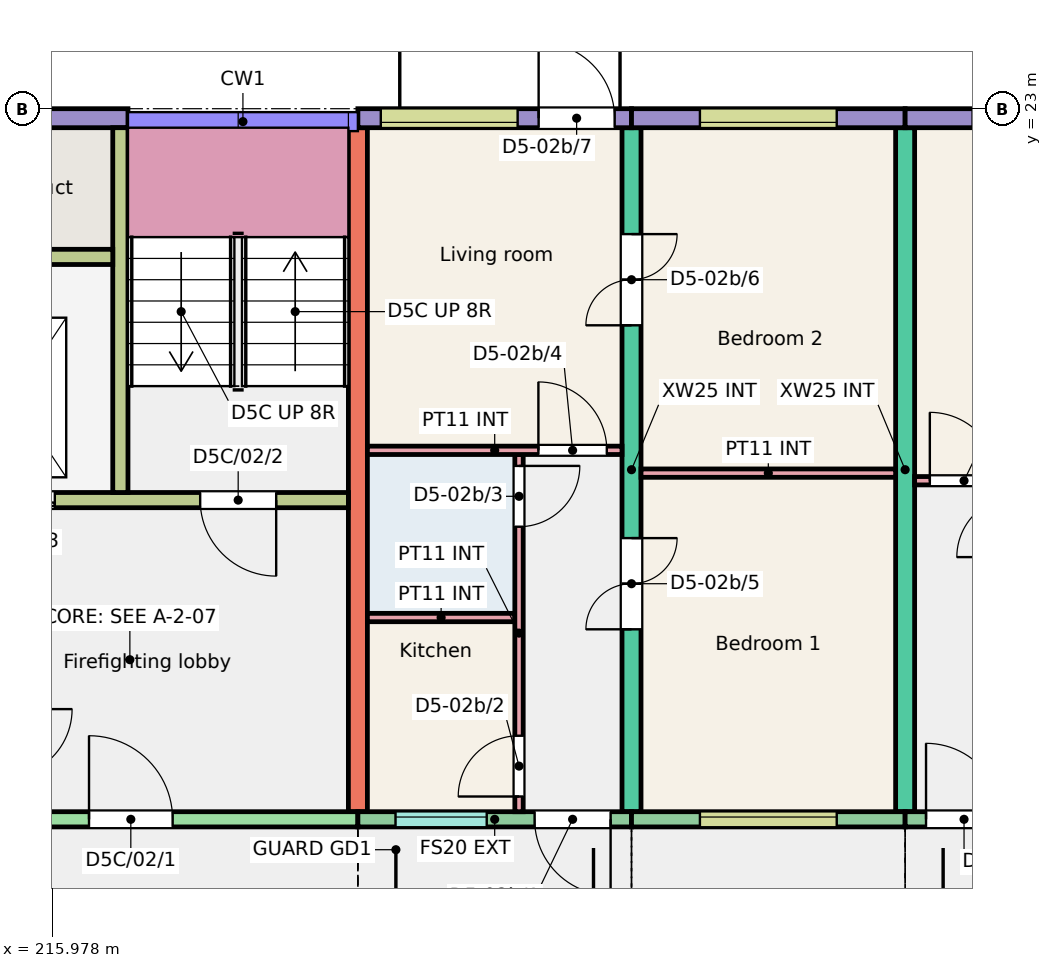
"""IFC4 building model, lengths in metres.
Left out: names, types, materials, properties, quantities, classifications, styles, units other than length and angle.
Written with IfcOpenShell. Run it as: python <this file> out.ifc"""

import sys

from ifc_helpers import new_model, si_unit, direction, frame, frame_2d, origin, place, context, subcontext, project, spatial, rectangle, extrude, element, fill, save


model = new_model("IFC4")
c1 = context("Model", 3, precision=1e-05, world=origin(), true_north=direction((0.0, 1.0)))
c2 = subcontext(c1, "Body", "Model", "MODEL_VIEW")
j1 = project(units=[si_unit("LENGTHUNIT", "METRE"), si_unit("PLANEANGLEUNIT", "RADIAN")], contexts=[c1])
p1 = place(None, origin())
s1 = spatial("IfcSite", under=j1, at=p1, CompositionType="ELEMENT")
p2 = place(p1, origin())
s2 = spatial("IfcBuilding", under=s1, at=p2, CompositionType="ELEMENT")
p3 = place(p2, frame((0.0, 0.0, 6.0)))
s3 = spatial("IfcBuildingStorey", under=s2, at=p3, CompositionType="ELEMENT", Elevation=6.0)
p4 = place(p3, frame((220.0, 13.75, 0.0), z_axis=(0.0, 0.0, 1.0), x_axis=(0.0, 1.0, 0.0)))
e1 = element("IfcWall", 1, at=p4, inside=s3, PredefinedType="SHEAR", context=c2, shape_type="SweptSolid", body=[
    extrude(rectangle(XDim=9.0, YDim=0.25, at=frame_2d((4.5, 0.0))), origin(), (0.0, 0.0, 1.0), 3.0),
])
p5 = place(p3, frame((223.6, 13.75, 0.0), z_axis=(0.0, 0.0, 1.0), x_axis=(0.0, 1.0, 0.0)))
e2 = element("IfcWall", 2, at=p5, inside=s3, PredefinedType="SHEAR", context=c2, shape_type="SweptSolid", body=[
    extrude(rectangle(XDim=9.0, YDim=0.25, at=frame_2d((4.5, 0.0))), origin(), (0.0, 0.0, 1.0), 3.0),
])
p6 = place(p5, frame((2.4, 0.0, 0.0)))
e3 = element("IfcOpeningElement", 3, at=p6, cuts=e2, PredefinedType="OPENING", context=c2, shape_type="SweptSolid", body=[
    extrude(rectangle(XDim=1.2, YDim=2.1, at=frame_2d((0.6, 1.05))), frame((0.0, 0.135, 0.0), z_axis=(0.0, -1.0, 0.0), x_axis=(1.0, 0.0, 0.0)), (0.0, 0.0, 1.0), 0.27),
])
p7 = place(p5, frame((6.4, 0.0, 0.0)))
e4 = element("IfcOpeningElement", 4, at=p7, cuts=e2, PredefinedType="OPENING", context=c2, shape_type="SweptSolid", body=[
    extrude(rectangle(XDim=1.2, YDim=2.1, at=frame_2d((0.6, 1.05))), frame((0.0, 0.135, 0.0), z_axis=(0.0, -1.0, 0.0), x_axis=(1.0, 0.0, 0.0)), (0.0, 0.0, 1.0), 0.27),
])
p8 = place(p3, frame((227.2, 13.75, 0.0), z_axis=(0.0, 0.0, 1.0), x_axis=(0.0, 1.0, 0.0)))
e5 = element("IfcWall", 5, at=p8, inside=s3, PredefinedType="SHEAR", context=c2, shape_type="SweptSolid", body=[
    extrude(rectangle(XDim=9.0, YDim=0.25, at=frame_2d((4.5, 0.0))), origin(), (0.0, 0.0, 1.0), 3.0),
])
p9 = place(p3, frame((214.0, 22.875, 0.0), z_axis=(0.0, 0.0, 1.0), x_axis=(1.0, 0.0, 0.0)))
e6 = element("IfcWall", 6, at=p9, inside=s3, PredefinedType="SOLIDWALL", context=c2, shape_type="SweptSolid", body=[
    extrude(rectangle(XDim=2.975, YDim=0.25, at=frame_2d((1.488, 0.0))), origin(), (0.0, 0.0, 1.0), 3.0),
])
p10 = place(p3, frame((214.15, 13.65, 0.0), z_axis=(0.0, 0.0, 1.0), x_axis=(1.0, 0.0, 0.0)))
e7 = element("IfcWall", 7, at=p10, inside=s3, PredefinedType="SHEAR", context=c2, shape_type="SweptSolid", body=[
    extrude(rectangle(XDim=5.85, YDim=0.2, at=frame_2d((2.925, 0.0))), origin(), (0.0, 0.0, 1.0), 3.0),
])
p11 = place(p10, frame((2.312, 0.0, 0.0)))
e8 = element("IfcOpeningElement", 8, at=p11, cuts=e7, PredefinedType="OPENING", context=c2, shape_type="SweptSolid", body=[
    extrude(rectangle(XDim=1.1, YDim=2.1, at=frame_2d((0.55, 1.05))), frame((0.0, 0.11, 0.0), z_axis=(0.0, -1.0, 0.0), x_axis=(1.0, 0.0, 0.0)), (0.0, 0.0, 1.0), 0.22),
])
p12 = place(p3, frame((214.15, 17.85, 0.0), z_axis=(0.0, 0.0, 1.0), x_axis=(1.0, 0.0, 0.0)))
e9 = element("IfcWall", 9, at=p12, inside=s3, PredefinedType="SHEAR", context=c2, shape_type="SweptSolid", body=[
    extrude(rectangle(XDim=5.725, YDim=0.2, at=frame_2d((2.863, 0.0))), origin(), (0.0, 0.0, 1.0), 3.0),
])
p13 = place(p12, frame((3.775, 0.0, 0.0)))
e10 = element("IfcOpeningElement", 10, at=p13, cuts=e9, PredefinedType="OPENING", context=c2, shape_type="SweptSolid", body=[
    extrude(rectangle(XDim=1.0, YDim=2.1, at=frame_2d((0.5, 1.05))), frame((0.0, 0.11, 0.0), z_axis=(0.0, -1.0, 0.0), x_axis=(1.0, 0.0, 0.0)), (0.0, 0.0, 1.0), 0.22),
])
p14 = place(p12, frame((0.762, 0.0, 0.0)))
e11 = element("IfcOpeningElement", 11, at=p14, cuts=e9, PredefinedType="OPENING", context=c2, shape_type="SweptSolid", body=[
    extrude(rectangle(XDim=1.1, YDim=2.1, at=frame_2d((0.55, 1.05))), frame((0.0, 0.11, 0.0), z_axis=(0.0, -1.0, 0.0), x_axis=(1.0, 0.0, 0.0)), (0.0, 0.0, 1.0), 0.22),
])
p15 = place(p3, frame((216.875, 17.95, 0.0), z_axis=(0.0, 0.0, 1.0), x_axis=(0.0, 1.0, 0.0)))
e12 = element("IfcWall", 12, at=p15, inside=s3, PredefinedType="SHEAR", context=c2, shape_type="SweptSolid", body=[
    extrude(rectangle(XDim=4.8, YDim=0.2, at=frame_2d((2.4, 0.0))), origin(), (0.0, 0.0, 1.0), 3.0),
])
p16 = place(p3, frame((214.15, 21.05, 0.0), z_axis=(0.0, 0.0, 1.0), x_axis=(1.0, 0.0, 0.0)))
e13 = element("IfcWall", 13, at=p16, inside=s3, PredefinedType="SHEAR", context=c2, shape_type="SweptSolid", body=[
    extrude(rectangle(XDim=2.625, YDim=0.2, at=frame_2d((1.312, 0.0))), origin(), (0.0, 0.0, 1.0), 3.0),
])
p17 = place(p3, frame((220.0, 22.875, 0.0), z_axis=(0.0, 0.0, 1.0), x_axis=(1.0, 0.0, 0.0)))
e14 = element("IfcWall", 14, at=p17, inside=s3, PredefinedType="SOLIDWALL", context=c2, shape_type="SweptSolid", body=[
    extrude(rectangle(XDim=3.6, YDim=0.25, at=frame_2d((1.8, 0.0))), origin(), (0.0, 0.0, 1.0), 3.0),
])
p18 = place(p17, frame((0.302, 0.0, 1.1)))
e15 = element("IfcOpeningElement", 15, at=p18, cuts=e14, PredefinedType="OPENING", context=c2, shape_type="SweptSolid", body=[
    extrude(rectangle(XDim=1.8, YDim=1.3, at=frame_2d((0.9, 0.65))), frame((0.0, 0.135, 0.0), z_axis=(0.0, -1.0, 0.0), x_axis=(1.0, 0.0, 0.0)), (0.0, 0.0, 1.0), 0.27),
])
p19 = place(p17, frame((2.378, 0.0, 0.0)))
e16 = element("IfcOpeningElement", 16, at=p19, cuts=e14, PredefinedType="OPENING", context=c2, shape_type="SweptSolid", body=[
    extrude(rectangle(XDim=1.0, YDim=2.1, at=frame_2d((0.5, 1.05))), frame((0.0, 0.135, 0.0), z_axis=(0.0, -1.0, 0.0), x_axis=(1.0, 0.0, 0.0)), (0.0, 0.0, 1.0), 0.27),
])
p20 = place(p3, frame((220.0, 13.65, 0.0), z_axis=(0.0, 0.0, 1.0), x_axis=(1.0, 0.0, 0.0)))
e17 = element("IfcWall", 17, at=p20, inside=s3, PredefinedType="SOLIDWALL", context=c2, shape_type="SweptSolid", body=[
    extrude(rectangle(XDim=3.6, YDim=0.2, at=frame_2d((1.8, 0.0))), origin(), (0.0, 0.0, 1.0), 3.0),
])
p21 = place(p20, frame((0.495, 0.0, 1.1)))
e18 = element("IfcOpeningElement", 18, at=p21, cuts=e17, PredefinedType="OPENING", context=c2, shape_type="SweptSolid", body=[
    extrude(rectangle(XDim=1.2, YDim=1.3, at=frame_2d((0.6, 0.65))), frame((0.0, 0.11, 0.0), z_axis=(0.0, -1.0, 0.0), x_axis=(1.0, 0.0, 0.0)), (0.0, 0.0, 1.0), 0.22),
])
p22 = place(p20, frame((2.325, 0.0, 0.0)))
e19 = element("IfcOpeningElement", 19, at=p22, cuts=e17, PredefinedType="OPENING", context=c2, shape_type="SweptSolid", body=[
    extrude(rectangle(XDim=1.0, YDim=2.1, at=frame_2d((0.5, 1.05))), frame((0.0, 0.11, 0.0), z_axis=(0.0, -1.0, 0.0), x_axis=(1.0, 0.0, 0.0)), (0.0, 0.0, 1.0), 0.22),
])
p23 = place(p3, frame((223.6, 22.875, 0.0), z_axis=(0.0, 0.0, 1.0), x_axis=(1.0, 0.0, 0.0)))
e20 = element("IfcWall", 20, at=p23, inside=s3, PredefinedType="SOLIDWALL", context=c2, shape_type="SweptSolid", body=[
    extrude(rectangle(XDim=3.6, YDim=0.25, at=frame_2d((1.8, 0.0))), origin(), (0.0, 0.0, 1.0), 3.0),
])
p24 = place(p23, frame((0.9, 0.0, 1.1)))
e21 = element("IfcOpeningElement", 21, at=p24, cuts=e20, PredefinedType="OPENING", context=c2, shape_type="SweptSolid", body=[
    extrude(rectangle(XDim=1.8, YDim=1.3, at=frame_2d((0.9, 0.65))), frame((0.0, 0.135, 0.0), z_axis=(0.0, -1.0, 0.0), x_axis=(1.0, 0.0, 0.0)), (0.0, 0.0, 1.0), 0.27),
])
p25 = place(p3, frame((223.6, 13.65, 0.0), z_axis=(0.0, 0.0, 1.0), x_axis=(1.0, 0.0, 0.0)))
e22 = element("IfcWall", 22, at=p25, inside=s3, PredefinedType="SOLIDWALL", context=c2, shape_type="SweptSolid", body=[
    extrude(rectangle(XDim=3.6, YDim=0.2, at=frame_2d((1.8, 0.0))), origin(), (0.0, 0.0, 1.0), 3.0),
])
p26 = place(p25, frame((0.9, 0.0, 1.1)))
e23 = element("IfcOpeningElement", 23, at=p26, cuts=e22, PredefinedType="OPENING", context=c2, shape_type="SweptSolid", body=[
    extrude(rectangle(XDim=1.8, YDim=1.3, at=frame_2d((0.9, 0.65))), frame((0.0, 0.11, 0.0), z_axis=(0.0, -1.0, 0.0), x_axis=(1.0, 0.0, 0.0)), (0.0, 0.0, 1.0), 0.22),
])
p27 = place(p3, frame((227.2, 22.875, 0.0), z_axis=(0.0, 0.0, 1.0), x_axis=(1.0, 0.0, 0.0)))
e24 = element("IfcWall", 24, at=p27, inside=s3, PredefinedType="SOLIDWALL", context=c2, shape_type="SweptSolid", body=[
    extrude(rectangle(XDim=3.6, YDim=0.25, at=frame_2d((1.8, 0.0))), origin(), (0.0, 0.0, 1.0), 3.0),
])
p28 = place(p27, frame((0.887, 0.0, 1.1)))
e25 = element("IfcOpeningElement", 25, at=p28, cuts=e24, PredefinedType="OPENING", context=c2, shape_type="SweptSolid", body=[
    extrude(rectangle(XDim=1.8, YDim=1.3, at=frame_2d((0.9, 0.65))), frame((0.0, 0.135, 0.0), z_axis=(0.0, -1.0, 0.0), x_axis=(1.0, 0.0, 0.0)), (0.0, 0.0, 1.0), 0.27),
])
p29 = place(p3, frame((227.2, 13.65, 0.0), z_axis=(0.0, 0.0, 1.0), x_axis=(1.0, 0.0, 0.0)))
e26 = element("IfcWall", 26, at=p29, inside=s3, PredefinedType="SOLIDWALL", context=c2, shape_type="SweptSolid", body=[
    extrude(rectangle(XDim=3.45, YDim=0.2, at=frame_2d((1.725, 0.0))), origin(), (0.0, 0.0, 1.0), 3.0),
])
p30 = place(p29, frame((1.893, 0.0, 1.1)))
e27 = element("IfcOpeningElement", 27, at=p30, cuts=e26, PredefinedType="OPENING", context=c2, shape_type="SweptSolid", body=[
    extrude(rectangle(XDim=1.2, YDim=1.3, at=frame_2d((0.6, 0.65))), frame((0.0, 0.11, 0.0), z_axis=(0.0, -1.0, 0.0), x_axis=(1.0, 0.0, 0.0)), (0.0, 0.0, 1.0), 0.22),
])
p31 = place(p29, frame((0.275, 0.0, 0.0)))
e28 = element("IfcOpeningElement", 28, at=p31, cuts=e26, PredefinedType="OPENING", context=c2, shape_type="SweptSolid", body=[
    extrude(rectangle(XDim=1.0, YDim=2.1, at=frame_2d((0.5, 1.05))), frame((0.0, 0.11, 0.0), z_axis=(0.0, -1.0, 0.0), x_axis=(1.0, 0.0, 0.0)), (0.0, 0.0, 1.0), 0.22),
])
p32 = place(p3, frame((227.325, 18.105, 0.0), z_axis=(0.0, 0.0, 1.0), x_axis=(1.0, 0.0, 0.0)))
e29 = element("IfcWall", 29, at=p32, inside=s3, PredefinedType="PARTITIONING", context=c2, shape_type="SweptSolid", body=[
    extrude(rectangle(XDim=3.325, YDim=0.11, at=frame_2d((1.663, 0.0))), origin(), (0.0, 0.0, 1.0), 2.8),
])
p33 = place(p32, frame((0.2, 0.0, 0.0)))
e30 = element("IfcOpeningElement", 30, at=p33, cuts=e29, PredefinedType="OPENING", context=c2, shape_type="SweptSolid", body=[
    extrude(rectangle(XDim=0.9, YDim=2.1, at=frame_2d((0.45, 1.05))), frame((0.0, 0.065, 0.0), z_axis=(0.0, -1.0, 0.0), x_axis=(1.0, 0.0, 0.0)), (0.0, 0.0, 1.0), 0.13),
])
p34 = place(p3, frame((220.125, 16.305, 0.0), z_axis=(0.0, 0.0, 1.0), x_axis=(1.0, 0.0, 0.0)))
e31 = element("IfcWall", 31, at=p34, inside=s3, PredefinedType="PARTITIONING", context=c2, shape_type="SweptSolid", body=[
    extrude(rectangle(XDim=1.94, YDim=0.11, at=frame_2d((0.97, 0.0))), origin(), (0.0, 0.0, 1.0), 2.8),
])
p35 = place(p3, frame((222.12, 13.75, 0.0), z_axis=(0.0, 0.0, 1.0), x_axis=(0.0, 1.0, 0.0)))
e32 = element("IfcWall", 32, at=p35, inside=s3, PredefinedType="PARTITIONING", context=c2, shape_type="SweptSolid", body=[
    extrude(rectangle(XDim=4.7, YDim=0.11, at=frame_2d((2.35, 0.0))), origin(), (0.0, 0.0, 1.0), 2.8),
])
p36 = place(p35, frame((0.2, 0.0, 0.0)))
e33 = element("IfcOpeningElement", 33, at=p36, cuts=e32, PredefinedType="OPENING", context=c2, shape_type="SweptSolid", body=[
    extrude(rectangle(XDim=0.8, YDim=2.1, at=frame_2d((0.4, 1.05))), frame((0.0, 0.065, 0.0), z_axis=(0.0, -1.0, 0.0), x_axis=(1.0, 0.0, 0.0)), (0.0, 0.0, 1.0), 0.13),
])
p37 = place(p35, frame((3.75, 0.0, 0.0)))
e34 = element("IfcOpeningElement", 34, at=p37, cuts=e32, PredefinedType="OPENING", context=c2, shape_type="SweptSolid", body=[
    extrude(rectangle(XDim=0.8, YDim=2.1, at=frame_2d((0.4, 1.05))), frame((0.0, 0.065, 0.0), z_axis=(0.0, -1.0, 0.0), x_axis=(1.0, 0.0, 0.0)), (0.0, 0.0, 1.0), 0.13),
])
p38 = place(p3, frame((220.125, 18.505, 0.0), z_axis=(0.0, 0.0, 1.0), x_axis=(1.0, 0.0, 0.0)))
e35 = element("IfcWall", 35, at=p38, inside=s3, PredefinedType="PARTITIONING", context=c2, shape_type="SweptSolid", body=[
    extrude(rectangle(XDim=3.35, YDim=0.11, at=frame_2d((1.675, 0.0))), origin(), (0.0, 0.0, 1.0), 2.8),
])
p39 = place(p38, frame((2.25, 0.0, 0.0)))
e36 = element("IfcOpeningElement", 36, at=p39, cuts=e35, PredefinedType="OPENING", context=c2, shape_type="SweptSolid", body=[
    extrude(rectangle(XDim=0.9, YDim=2.1, at=frame_2d((0.45, 1.05))), frame((0.0, 0.065, 0.0), z_axis=(0.0, -1.0, 0.0), x_axis=(1.0, 0.0, 0.0)), (0.0, 0.0, 1.0), 0.13),
])
p40 = place(p3, frame((223.725, 18.205, 0.0), z_axis=(0.0, 0.0, 1.0), x_axis=(1.0, 0.0, 0.0)))
e37 = element("IfcWall", 37, at=p40, inside=s3, PredefinedType="PARTITIONING", context=c2, shape_type="SweptSolid", body=[
    extrude(rectangle(XDim=3.35, YDim=0.11, at=frame_2d((1.675, 0.0))), origin(), (0.0, 0.0, 1.0), 2.8),
])
p41 = place(p26, origin())
e38 = element("IfcWindow", 38, at=p41, inside=s3, PartitioningType="SINGLE_PANEL", PredefinedType="WINDOW", context=c2, shape_type="SweptSolid", body=[
    extrude(rectangle(XDim=1.8, YDim=1.3, at=frame_2d((0.9, 0.65))), frame((0.0, 0.06, 0.0), z_axis=(0.0, -1.0, 0.0), x_axis=(1.0, 0.0, 0.0)), (0.0, 0.0, 1.0), 0.06),
])
fill(e23, e38)
p42 = place(p24, origin())
e39 = element("IfcWindow", 39, at=p42, inside=s3, PartitioningType="SINGLE_PANEL", PredefinedType="WINDOW", context=c2, shape_type="SweptSolid", body=[
    extrude(rectangle(XDim=1.8, YDim=1.3, at=frame_2d((0.9, 0.65))), frame((0.0, -0.025, 0.0), z_axis=(0.0, -1.0, 0.0), x_axis=(1.0, 0.0, 0.0)), (0.0, 0.0, 1.0), 0.06),
])
fill(e21, e39)
p43 = place(p21, origin())
e40 = element("IfcWindow", 40, at=p43, inside=s3, PartitioningType="SINGLE_PANEL", PredefinedType="WINDOW", context=c2, shape_type="SweptSolid", body=[
    extrude(rectangle(XDim=1.2, YDim=1.3, at=frame_2d((0.6, 0.65))), frame((0.0, 0.06, 0.0), z_axis=(0.0, -1.0, 0.0), x_axis=(1.0, 0.0, 0.0)), (0.0, 0.0, 1.0), 0.06),
])
fill(e18, e40)
p44 = place(p18, origin())
e41 = element("IfcWindow", 41, at=p44, inside=s3, PartitioningType="SINGLE_PANEL", PredefinedType="WINDOW", context=c2, shape_type="SweptSolid", body=[
    extrude(rectangle(XDim=1.8, YDim=1.3, at=frame_2d((0.9, 0.65))), frame((0.0, -0.025, 0.0), z_axis=(0.0, -1.0, 0.0), x_axis=(1.0, 0.0, 0.0)), (0.0, 0.0, 1.0), 0.06),
])
fill(e15, e41)
p45 = place(p31, origin())
e42 = element("IfcDoor", 42, at=p45, inside=s3, OperationType="SINGLE_SWING_LEFT", PredefinedType="DOOR", context=c2, shape_type="SweptSolid", body=[
    extrude(rectangle(XDim=1.0, YDim=2.1, at=frame_2d((0.5, 1.05))), frame((0.0, 0.025, 0.0), z_axis=(0.0, -1.0, 0.0), x_axis=(1.0, 0.0, 0.0)), (0.0, 0.0, 1.0), 0.05),
])
fill(e28, e42)
p46 = place(p33, origin())
e43 = element("IfcDoor", 43, at=p46, inside=s3, OperationType="SINGLE_SWING_LEFT", PredefinedType="DOOR", context=c2, shape_type="SweptSolid", body=[
    extrude(rectangle(XDim=0.9, YDim=2.1, at=frame_2d((0.45, 1.05))), frame((0.0, 0.025, 0.0), z_axis=(0.0, -1.0, 0.0), x_axis=(1.0, 0.0, 0.0)), (0.0, 0.0, 1.0), 0.05),
])
fill(e30, e43)
p47 = place(p22, origin())
e44 = element("IfcDoor", 44, at=p47, inside=s3, OperationType="SINGLE_SWING_RIGHT", PredefinedType="DOOR", context=c2, shape_type="SweptSolid", body=[
    extrude(rectangle(XDim=1.0, YDim=2.1, at=frame_2d((0.5, 1.05))), frame((0.0, 0.025, 0.0), z_axis=(0.0, -1.0, 0.0), x_axis=(1.0, 0.0, 0.0)), (0.0, 0.0, 1.0), 0.05),
])
fill(e19, e44)
p48 = place(p36, origin())
e45 = element("IfcDoor", 45, at=p48, inside=s3, OperationType="SINGLE_SWING_LEFT", PredefinedType="DOOR", context=c2, shape_type="SweptSolid", body=[
    extrude(rectangle(XDim=0.8, YDim=2.1, at=frame_2d((0.4, 1.05))), frame((0.0, 0.025, 0.0), z_axis=(0.0, -1.0, 0.0), x_axis=(1.0, 0.0, 0.0)), (0.0, 0.0, 1.0), 0.05),
])
fill(e33, e45)
p49 = place(p37, origin())
e46 = element("IfcDoor", 46, at=p49, inside=s3, OperationType="SINGLE_SWING_RIGHT", PredefinedType="DOOR", context=c2, shape_type="SweptSolid", body=[
    extrude(rectangle(XDim=0.8, YDim=2.1, at=frame_2d((0.4, 1.05))), frame((0.0, 0.025, 0.0), z_axis=(0.0, -1.0, 0.0), x_axis=(1.0, 0.0, 0.0)), (0.0, 0.0, 1.0), 0.05),
])
fill(e34, e46)
p50 = place(p39, origin())
e47 = element("IfcDoor", 47, at=p50, inside=s3, OperationType="SINGLE_SWING_LEFT", PredefinedType="DOOR", context=c2, shape_type="SweptSolid", body=[
    extrude(rectangle(XDim=0.9, YDim=2.1, at=frame_2d((0.45, 1.05))), frame((0.0, 0.025, 0.0), z_axis=(0.0, -1.0, 0.0), x_axis=(1.0, 0.0, 0.0)), (0.0, 0.0, 1.0), 0.05),
])
fill(e36, e47)
p51 = place(p6, origin())
e48 = element("IfcDoor", 48, at=p51, inside=s3, OperationType="DOUBLE_DOOR_SINGLE_SWING", PredefinedType="DOOR", context=c2, shape_type="SweptSolid", body=[
    extrude(rectangle(XDim=1.2, YDim=2.1, at=frame_2d((0.6, 1.05))), frame((0.0, 0.025, 0.0), z_axis=(0.0, -1.0, 0.0), x_axis=(1.0, 0.0, 0.0)), (0.0, 0.0, 1.0), 0.05),
])
fill(e3, e48)
p52 = place(p7, origin())
e49 = element("IfcDoor", 49, at=p52, inside=s3, OperationType="DOUBLE_DOOR_SINGLE_SWING", PredefinedType="DOOR", context=c2, shape_type="SweptSolid", body=[
    extrude(rectangle(XDim=1.2, YDim=2.1, at=frame_2d((0.6, 1.05))), frame((0.0, 0.025, 0.0), z_axis=(0.0, -1.0, 0.0), x_axis=(1.0, 0.0, 0.0)), (0.0, 0.0, 1.0), 0.05),
])
fill(e4, e49)
p53 = place(p19, origin())
e50 = element("IfcDoor", 50, at=p53, inside=s3, OperationType="SINGLE_SWING_LEFT", PredefinedType="DOOR", context=c2, shape_type="SweptSolid", body=[
    extrude(rectangle(XDim=1.0, YDim=2.1, at=frame_2d((0.5, 1.05))), frame((0.0, 0.025, 0.0), z_axis=(0.0, -1.0, 0.0), x_axis=(1.0, 0.0, 0.0)), (0.0, 0.0, 1.0), 0.05),
])
fill(e16, e50)
p54 = place(p11, origin())
e51 = element("IfcDoor", 51, at=p54, inside=s3, OperationType="SINGLE_SWING_LEFT", PredefinedType="DOOR", context=c2, shape_type="SweptSolid", body=[
    extrude(rectangle(XDim=1.1, YDim=2.1, at=frame_2d((0.55, 1.05))), frame((0.0, 0.025, 0.0), z_axis=(0.0, -1.0, 0.0), x_axis=(1.0, 0.0, 0.0)), (0.0, 0.0, 1.0), 0.05),
])
fill(e8, e51)
p55 = place(p13, origin())
e52 = element("IfcDoor", 52, at=p55, inside=s3, OperationType="SINGLE_SWING_RIGHT", PredefinedType="DOOR", context=c2, shape_type="SweptSolid", body=[
    extrude(rectangle(XDim=1.0, YDim=2.1, at=frame_2d((0.5, 1.05))), frame((0.0, 0.025, 0.0), z_axis=(0.0, -1.0, 0.0), x_axis=(1.0, 0.0, 0.0)), (0.0, 0.0, 1.0), 0.05),
])
fill(e10, e52)
p56 = place(p14, origin())
e53 = element("IfcDoor", 53, at=p56, inside=s3, OperationType="DOUBLE_DOOR_SLIDING", PredefinedType="DOOR", context=c2, shape_type="SweptSolid", body=[
    extrude(rectangle(XDim=1.1, YDim=2.1, at=frame_2d((0.55, 1.05))), frame((0.0, 0.025, 0.0), z_axis=(0.0, -1.0, 0.0), x_axis=(1.0, 0.0, 0.0)), (0.0, 0.0, 1.0), 0.05),
])
fill(e11, e53)
save(model, sys.argv[1])
